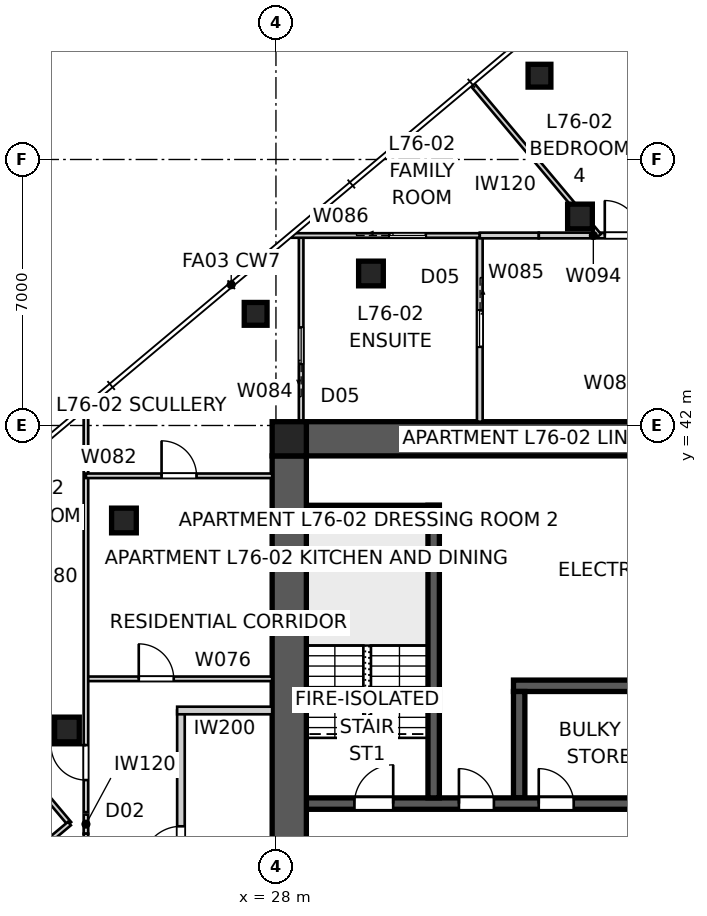
"""IFC4 building model, lengths in metres.
Left out: names, types, materials, properties, quantities, classifications, styles, units other than length and angle.
Written with IfcOpenShell. Run it as: python <this file> out.ifc"""

import sys

from ifc_helpers import new_model, si_unit, direction, frame, frame_2d, origin, origin_2d, place, context, subcontext, project, spatial, polyline, rectangle, outline, extrude, element, fill, save


model = new_model("IFC4")
c1 = context("Model", 3, precision=1e-05, world=origin(), true_north=direction((0.0, 1.0)))
c2 = subcontext(c1, "Body", "Model", "MODEL_VIEW")
j1 = project(units=[si_unit("LENGTHUNIT", "METRE"), si_unit("PLANEANGLEUNIT", "RADIAN")], contexts=[c1])
p1 = place(None, origin())
s1 = spatial("IfcSite", under=j1, at=p1, CompositionType="ELEMENT")
p2 = place(p1, origin())
s2 = spatial("IfcBuilding", under=s1, at=p2, CompositionType="ELEMENT")
p3 = place(p2, frame((0.0, 0.0, 276.0)))
s3 = spatial("IfcBuildingStorey", under=s2, at=p3, CompositionType="ELEMENT", Elevation=276.0)
p4 = place(p3, frame((28.8, 41.65, 0.0), z_axis=(0.0, 0.0, 1.0), x_axis=(1.0, 0.0, 0.0)))
e1 = element("IfcWall", 1, at=p4, inside=s3, PredefinedType="SHEAR", context=c2, shape_type="SweptSolid", body=[
    extrude(outline(polyline([(0.0, -0.45), (22.4, -0.45), (22.4, -0.025), (22.85, -0.025), (22.85, 0.025), (22.4, 0.025), (22.4, 0.45), (0.0, 0.45), (0.0, 0.025), (-0.45, 0.025), (-0.45, -0.025), (0.0, -0.025), (0.0, -0.45)])), origin(), (0.0, 0.0, 1.0), 3.4),
])
p5 = place(p3, frame((28.35, 41.2, 0.0), z_axis=(0.0, 0.0, 1.0), x_axis=(0.0, -1.0, 0.0)))
e2 = element("IfcWall", 2, at=p5, inside=s3, PredefinedType="SHEAR", context=c2, shape_type="SweptSolid", body=[
    extrude(outline(polyline([(0.0, -0.45), (22.4, -0.45), (22.4, -0.025), (22.85, -0.025), (22.85, 0.025), (22.4, 0.025), (22.4, 0.45), (0.0, 0.45), (0.0, 0.025), (-0.45, 0.025), (-0.45, -0.025), (0.0, -0.025), (0.0, -0.45)])), origin(), (0.0, 0.0, 1.0), 3.4),
])
p6 = place(p5, frame((11.14, 0.0, 0.0)))
e3 = element("IfcOpeningElement", 3, at=p6, cuts=e2, PredefinedType="OPENING", context=c2, shape_type="SweptSolid", body=[
    extrude(rectangle(XDim=1.02, YDim=2.4, at=frame_2d((0.51, 1.2))), frame((0.0, 0.46, 0.0), z_axis=(0.0, -1.0, 0.0), x_axis=(1.0, 0.0, 0.0)), (0.0, 0.0, 1.0), 0.92),
])
p7 = place(p3, frame((28.8, 32.05, 0.0), z_axis=(0.0, 0.0, 1.0), x_axis=(1.0, 0.0, 0.0)))
e4 = element("IfcWall", 4, at=p7, inside=s3, PredefinedType="SHEAR", context=c2, shape_type="SweptSolid", body=[
    extrude(rectangle(XDim=22.4, YDim=0.3, at=frame_2d((11.2, 0.0))), origin(), (0.0, 0.0, 1.0), 3.4),
])
p8 = place(p7, frame((19.04, 0.0, 0.0)))
e5 = element("IfcOpeningElement", 5, at=p8, cuts=e4, PredefinedType="OPENING", context=c2, shape_type="SweptSolid", body=[
    extrude(rectangle(XDim=0.92, YDim=2.1, at=frame_2d((0.46, 1.05))), frame((0.0, 0.16, 0.0), z_axis=(0.0, -1.0, 0.0), x_axis=(1.0, 0.0, 0.0)), (0.0, 0.0, 1.0), 0.32),
])
p9 = place(p7, frame((1.265, 0.0, 0.0)))
e6 = element("IfcOpeningElement", 6, at=p9, cuts=e4, PredefinedType="OPENING", context=c2, shape_type="SweptSolid", body=[
    extrude(rectangle(XDim=1.02, YDim=2.1, at=frame_2d((0.51, 1.05))), frame((0.0, 0.16, 0.0), z_axis=(0.0, -1.0, 0.0), x_axis=(1.0, 0.0, 0.0)), (0.0, 0.0, 1.0), 0.32),
])
p10 = place(p7, frame((4.015, 0.0, 0.0)))
e7 = element("IfcOpeningElement", 7, at=p10, cuts=e4, PredefinedType="OPENING", context=c2, shape_type="SweptSolid", body=[
    extrude(rectangle(XDim=0.92, YDim=2.1, at=frame_2d((0.46, 1.05))), frame((0.0, 0.16, 0.0), z_axis=(0.0, -1.0, 0.0), x_axis=(1.0, 0.0, 0.0)), (0.0, 0.0, 1.0), 0.32),
])
p11 = place(p7, frame((6.115, 0.0, 0.0)))
e8 = element("IfcOpeningElement", 8, at=p11, cuts=e4, PredefinedType="OPENING", context=c2, shape_type="SweptSolid", body=[
    extrude(rectangle(XDim=0.92, YDim=2.1, at=frame_2d((0.46, 1.05))), frame((0.0, 0.16, 0.0), z_axis=(0.0, -1.0, 0.0), x_axis=(1.0, 0.0, 0.0)), (0.0, 0.0, 1.0), 0.32),
])
p12 = place(p7, frame((9.79, 0.0, 0.0)))
e9 = element("IfcOpeningElement", 9, at=p12, cuts=e4, PredefinedType="OPENING", context=c2, shape_type="SweptSolid", body=[
    extrude(rectangle(XDim=0.92, YDim=2.1, at=frame_2d((0.46, 1.05))), frame((0.0, 0.16, 0.0), z_axis=(0.0, -1.0, 0.0), x_axis=(1.0, 0.0, 0.0)), (0.0, 0.0, 1.0), 0.32),
])
p13 = place(p7, frame((12.05, 0.0, 0.0)))
e10 = element("IfcOpeningElement", 10, at=p13, cuts=e4, PredefinedType="OPENING", context=c2, shape_type="SweptSolid", body=[
    extrude(rectangle(XDim=1.1, YDim=2.1, at=frame_2d((0.55, 1.05))), frame((0.0, 0.16, 0.0), z_axis=(0.0, -1.0, 0.0), x_axis=(1.0, 0.0, 0.0)), (0.0, 0.0, 1.0), 0.32),
])
p14 = place(p7, frame((14.85, 0.0, 0.0)))
e11 = element("IfcOpeningElement", 11, at=p14, cuts=e4, PredefinedType="OPENING", context=c2, shape_type="SweptSolid", body=[
    extrude(rectangle(XDim=1.1, YDim=2.1, at=frame_2d((0.55, 1.05))), frame((0.0, 0.16, 0.0), z_axis=(0.0, -1.0, 0.0), x_axis=(1.0, 0.0, 0.0)), (0.0, 0.0, 1.0), 0.32),
])
p15 = place(p3, frame((34.25, 35.15, 0.0), z_axis=(0.0, 0.0, 1.0), x_axis=(1.0, 0.0, 0.0)))
e12 = element("IfcWall", 12, at=p15, inside=s3, PredefinedType="SHEAR", context=c2, shape_type="SweptSolid", body=[
    extrude(rectangle(XDim=11.5, YDim=0.3, at=frame_2d((5.75, 0.0))), origin(), (0.0, 0.0, 1.0), 3.4),
])
p16 = place(p3, frame((34.4, 32.2, 0.0), z_axis=(0.0, 0.0, 1.0), x_axis=(0.0, 1.0, 0.0)))
e13 = element("IfcWall", 13, at=p16, inside=s3, PredefinedType="SHEAR", context=c2, shape_type="SweptSolid", body=[
    extrude(rectangle(XDim=2.8, YDim=0.3, at=frame_2d((1.4, 0.0))), origin(), (0.0, 0.0, 1.0), 3.4),
])
p17 = place(p3, frame((32.15, 32.2, 0.0), z_axis=(0.0, 0.0, 1.0), x_axis=(0.0, 1.0, 0.0)))
e14 = element("IfcWall", 14, at=p17, inside=s3, PredefinedType="SHEAR", context=c2, shape_type="SweptSolid", body=[
    extrude(rectangle(XDim=7.7, YDim=0.3, at=frame_2d((3.85, 0.0))), origin(), (0.0, 0.0, 1.0), 3.4),
])
p18 = place(p3, frame((28.8, 39.75, 0.0), z_axis=(0.0, 0.0, 1.0), x_axis=(1.0, 0.0, 0.0)))
e15 = element("IfcWall", 15, at=p18, inside=s3, PredefinedType="SHEAR", context=c2, shape_type="SweptSolid", body=[
    extrude(rectangle(XDim=3.5, YDim=0.3, at=frame_2d((1.75, 0.0))), origin(), (0.0, 0.0, 1.0), 3.4),
])
p19 = place(p3, frame((28.35, 41.65, 0.0), z_axis=(0.0, 0.0, 1.0), x_axis=(1.0, 0.0, 0.0)))
e16 = element("IfcColumn", 16, at=p19, inside=s3, PredefinedType="COLUMN", context=c2, shape_type="SweptSolid", body=[
    extrude(rectangle(XDim=0.9, YDim=0.9, at=origin_2d()), origin(), (0.0, 0.0, 1.0), 3.4),
])
for number, where, z_axis, x_axis in (
    (17, (34.935, 51.205, 0.0), (0.0, 0.0, 1.0), (1.0, 0.0, 0.0)),
    (18, (27.466, 44.938, 0.0), (0.0, 0.0, 1.0), (1.0, 0.0, 0.0)),
):
    element("IfcColumn", number, at=place(p3, frame(where, z_axis=z_axis, x_axis=x_axis)), inside=s3, PredefinedType="COLUMN", context=c2, shape_type="SweptSolid", body=[
        extrude(rectangle(XDim=0.6, YDim=0.6, at=origin_2d()), origin(), (0.0, 0.0, 1.0), 3.4),
    ])
for number, where, z_axis, x_axis in (
    (19, (36.0, 47.5, 0.0), (0.0, 0.0, 1.0), (1.0, 0.0, 0.0)),
    (20, (30.5, 46.0, 0.0), (0.0, 0.0, 1.0), (1.0, 0.0, 0.0)),
    (21, (24.0, 39.5, 0.0), (0.0, 0.0, 1.0), (1.0, 0.0, 0.0)),
    (22, (22.5, 34.0, 0.0), (0.0, 0.0, 1.0), (1.0, 0.0, 0.0)),
):
    element("IfcColumn", number, at=place(p3, frame(where, z_axis=z_axis, x_axis=x_axis)), inside=s3, PredefinedType="COLUMN", context=c2, shape_type="SweptSolid", body=[
        extrude(rectangle(XDim=0.65, YDim=0.65, at=origin_2d()), origin(), (0.0, 0.0, 1.0), 3.4),
    ])
p20 = place(p3, frame((25.5, 25.5, 0.0), z_axis=(0.0, 0.0, 1.0), x_axis=(0.0, 1.0, 0.0)))
e23 = element("IfcWall", 23, at=p20, inside=s3, PredefinedType="PARTITIONING", context=c2, shape_type="SweptSolid", body=[
    extrude(rectangle(XDim=9.0, YDim=0.2, at=frame_2d((4.5, 0.0))), origin(), (0.0, 0.0, 1.0), 3.25),
])
p21 = place(p20, frame((4.933, 0.0, 0.0)))
e24 = element("IfcOpeningElement", 24, at=p21, cuts=e23, PredefinedType="OPENING", context=c2, shape_type="SweptSolid", body=[
    extrude(rectangle(XDim=1.02, YDim=2.34, at=frame_2d((0.51, 1.17))), frame((0.0, 0.11, 0.0), z_axis=(0.0, -1.0, 0.0), x_axis=(1.0, 0.0, 0.0)), (0.0, 0.0, 1.0), 0.22),
])
p22 = place(p3, frame((27.9, 34.5, 0.0), z_axis=(0.0, 0.0, 1.0), x_axis=(-1.0, 0.0, 0.0)))
e25 = element("IfcWall", 25, at=p22, inside=s3, PredefinedType="PARTITIONING", context=c2, shape_type="SweptSolid", body=[
    extrude(rectangle(XDim=2.5, YDim=0.2, at=frame_2d((1.25, 0.0))), origin(), (0.0, 0.0, 1.0), 3.25),
])
p23 = place(p3, frame((23.0, 35.333, 0.0), z_axis=(0.0, 0.0, 1.0), x_axis=(1.0, 0.0, 0.0)))
e26 = element("IfcWall", 26, at=p23, inside=s3, PredefinedType="PARTITIONING", context=c2, shape_type="SweptSolid", body=[
    extrude(rectangle(XDim=4.9, YDim=0.12, at=frame_2d((2.45, 0.0))), origin(), (0.0, 0.0, 1.0), 3.25),
])
p24 = place(p23, frame((1.39, 0.0, 0.0)))
e27 = element("IfcOpeningElement", 27, at=p24, cuts=e26, PredefinedType="OPENING", context=c2, shape_type="SweptSolid", body=[
    extrude(rectangle(XDim=0.92, YDim=2.34, at=frame_2d((0.46, 1.17))), frame((0.0, 0.07, 0.0), z_axis=(0.0, -1.0, 0.0), x_axis=(1.0, 0.0, 0.0)), (0.0, 0.0, 1.0), 0.14),
])
p25 = place(p3, frame((23.0, 31.258, 0.0), z_axis=(0.0, 0.0, 1.0), x_axis=(0.0, 1.0, 0.0)))
e28 = element("IfcWall", 28, at=p25, inside=s3, PredefinedType="PARTITIONING", context=c2, shape_type="SweptSolid", body=[
    extrude(rectangle(XDim=0.504, YDim=0.12, at=frame_2d((0.252, 0.0))), origin(), (0.0, 0.0, 1.0), 3.25),
])
p26 = place(p3, frame((23.0, 31.824, 0.0), z_axis=(0.0, 0.0, 1.0), x_axis=(0.0, 1.0, 0.0)))
e29 = element("IfcWall", 29, at=p26, inside=s3, PredefinedType="PARTITIONING", context=c2, shape_type="SweptSolid", body=[
    extrude(rectangle(XDim=10.619, YDim=0.12, at=frame_2d((5.31, 0.0))), origin(), (0.0, 0.0, 1.0), 2.549),
])
p27 = place(p26, frame((0.844, 0.0, 0.0)))
e30 = element("IfcOpeningElement", 30, at=p27, cuts=e29, PredefinedType="OPENING", context=c2, shape_type="SweptSolid", body=[
    extrude(rectangle(XDim=0.92, YDim=2.34, at=frame_2d((0.46, 1.17))), frame((0.0, 0.07, 0.0), z_axis=(0.0, -1.0, 0.0), x_axis=(1.0, 0.0, 0.0)), (0.0, 0.0, 1.0), 0.14),
])
p28 = place(p3, frame((23.0, 40.676, 0.0), z_axis=(0.0, 0.0, 1.0), x_axis=(1.0, 0.0, 0.0)))
e31 = element("IfcWall", 31, at=p28, inside=s3, PredefinedType="PARTITIONING", context=c2, shape_type="SweptSolid", body=[
    extrude(rectangle(XDim=4.9, YDim=0.12, at=frame_2d((2.45, 0.0))), origin(), (0.0, 0.0, 1.0), 3.25),
])
p29 = place(p28, frame((1.99, 0.0, 0.0)))
e32 = element("IfcOpeningElement", 32, at=p29, cuts=e31, PredefinedType="OPENING", context=c2, shape_type="SweptSolid", body=[
    extrude(rectangle(XDim=0.92, YDim=2.1, at=frame_2d((0.46, 1.05))), frame((0.0, 0.07, 0.0), z_axis=(0.0, -1.0, 0.0), x_axis=(1.0, 0.0, 0.0)), (0.0, 0.0, 1.0), 0.14),
])
p30 = place(p3, frame((28.663, 41.18, 0.0), z_axis=(0.0, 0.0, 1.0), x_axis=(0.0, 1.0, 0.0)))
e33 = element("IfcWall", 33, at=p30, inside=s3, PredefinedType="PARTITIONING", context=c2, shape_type="SweptSolid", body=[
    extrude(rectangle(XDim=5.82, YDim=0.12, at=frame_2d((2.91, 0.0))), origin(), (0.0, 0.0, 1.0), 3.25),
])
p31 = place(p30, frame((2.44, 0.0, 0.0)))
e34 = element("IfcOpeningElement", 34, at=p31, cuts=e33, PredefinedType="OPENING", context=c2, shape_type="SweptSolid", body=[
    extrude(rectangle(XDim=0.96, YDim=2.1, at=frame_2d((0.48, 1.05))), frame((0.0, 0.07, 0.0), z_axis=(0.0, -1.0, 0.0), x_axis=(1.0, 0.0, 0.0)), (0.0, 0.0, 1.0), 0.14),
])
p32 = place(p3, frame((33.364, 47.0, 0.0), z_axis=(0.0, 0.0, 1.0), x_axis=(0.0, -1.0, 0.0)))
e35 = element("IfcWall", 35, at=p32, inside=s3, PredefinedType="SOLIDWALL", context=c2, shape_type="SweptSolid", body=[
    extrude(rectangle(XDim=4.9, YDim=0.15, at=frame_2d((2.45, 0.0))), origin(), (0.0, 0.0, 1.0), 3.25),
])
p33 = place(p32, frame((1.97, 0.0, 0.0)))
e36 = element("IfcOpeningElement", 36, at=p33, cuts=e35, PredefinedType="OPENING", context=c2, shape_type="SweptSolid", body=[
    extrude(rectangle(XDim=0.96, YDim=2.1, at=frame_2d((0.48, 1.05))), frame((0.0, 0.085, 0.0), z_axis=(0.0, -1.0, 0.0), x_axis=(1.0, 0.0, 0.0)), (0.0, 0.0, 1.0), 0.17),
])
p34 = place(p3, frame((28.43, 47.0, 0.0), z_axis=(0.0, 0.0, 1.0), x_axis=(1.0, 0.0, 0.0)))
e37 = element("IfcWall", 37, at=p34, inside=s3, PredefinedType="PARTITIONING", context=c2, shape_type="SweptSolid", body=[
    extrude(rectangle(XDim=4.934, YDim=0.12, at=frame_2d((2.467, 0.0))), origin(), (0.0, 0.0, 1.0), 3.25),
])
p35 = place(p34, frame((2.553, 0.0, 0.0)))
e38 = element("IfcOpeningElement", 38, at=p35, cuts=e37, PredefinedType="OPENING", context=c2, shape_type="SweptSolid", body=[
    extrude(rectangle(XDim=0.96, YDim=2.1, at=frame_2d((0.48, 1.05))), frame((0.0, 0.07, 0.0), z_axis=(0.0, -1.0, 0.0), x_axis=(1.0, 0.0, 0.0)), (0.0, 0.0, 1.0), 0.14),
])
p36 = place(p3, frame((33.364, 47.0, 0.0), z_axis=(0.0, 0.0, 1.0), x_axis=(1.0, 0.0, 0.0)))
e39 = element("IfcWall", 39, at=p36, inside=s3, PredefinedType="SOLIDWALL", context=c2, shape_type="SweptSolid", body=[
    extrude(rectangle(XDim=1.553, YDim=0.15, at=frame_2d((0.776, 0.0))), origin(), (0.0, 0.0, 1.0), 2.549),
])
p37 = place(p3, frame((34.917, 47.0, 0.0), z_axis=(0.0, 0.0, 1.0), x_axis=(1.0, 0.0, 0.0)))
e40 = element("IfcWall", 40, at=p37, inside=s3, PredefinedType="SOLIDWALL", context=c2, shape_type="SweptSolid", body=[
    extrude(rectangle(XDim=2.869, YDim=0.15, at=frame_2d((1.435, 0.0))), origin(), (0.0, 0.0, 1.0), 3.25),
])
p38 = place(p37, frame((1.736, 0.0, 0.0)))
e41 = element("IfcOpeningElement", 41, at=p38, cuts=e40, PredefinedType="OPENING", context=c2, shape_type="SweptSolid", body=[
    extrude(rectangle(XDim=0.92, YDim=2.34, at=frame_2d((0.46, 1.17))), frame((0.0, 0.085, 0.0), z_axis=(0.0, -1.0, 0.0), x_axis=(1.0, 0.0, 0.0)), (0.0, 0.0, 1.0), 0.17),
])
p39 = place(p3, frame((41.525, 47.434, 0.0), z_axis=(0.0, 0.0, 1.0), x_axis=(-0.642800378028, 0.766033729027, 0.0)))
e42 = element("IfcWall", 42, at=p39, inside=s3, PredefinedType="PARTITIONING", context=c2, shape_type="SweptSolid", body=[
    extrude(rectangle(XDim=8.085, YDim=0.12, at=frame_2d((4.042, 0.0))), origin(), (0.0, 0.0, 1.0), 3.25),
])
p40 = place(p39, frame((3.603, 0.0, 0.0)))
e43 = element("IfcOpeningElement", 43, at=p40, cuts=e42, PredefinedType="OPENING", context=c2, shape_type="SweptSolid", body=[
    extrude(rectangle(XDim=0.92, YDim=2.34, at=frame_2d((0.46, 1.17))), frame((0.0, 0.07, 0.0), z_axis=(0.0, -1.0, 0.0), x_axis=(1.0, 0.0, 0.0)), (0.0, 0.0, 1.0), 0.14),
])
p41 = place(p3, frame((17.369, 37.719, 0.0), z_axis=(0.0, 0.0, 1.0), x_axis=(0.642800378028, -0.766033729027, 0.0)))
e44 = element("IfcWall", 44, at=p41, inside=s3, PredefinedType="PARTITIONING", context=c2, shape_type="SweptSolid", body=[
    extrude(rectangle(XDim=8.085, YDim=0.12, at=frame_2d((4.042, 0.0))), origin(), (0.0, 0.0, 1.0), 3.25),
])
p42 = place(p41, frame((3.562, 0.0, 0.0)))
e45 = element("IfcOpeningElement", 45, at=p42, cuts=e44, PredefinedType="OPENING", context=c2, shape_type="SweptSolid", body=[
    extrude(rectangle(XDim=0.92, YDim=2.34, at=frame_2d((0.46, 1.17))), frame((0.0, 0.07, 0.0), z_axis=(0.0, -1.0, 0.0), x_axis=(1.0, 0.0, 0.0)), (0.0, 0.0, 1.0), 0.14),
])
p43 = place(p3, frame((22.566, 31.525, 0.0), z_axis=(0.0, 0.0, 1.0), x_axis=(-0.766033729027, -0.642800378028, 0.0)))
e46 = element("IfcWall", 46, at=p43, inside=s3, PredefinedType="PARTITIONING", context=c2, shape_type="SweptSolid", body=[
    extrude(rectangle(XDim=8.085, YDim=0.12, at=frame_2d((4.042, 0.0))), origin(), (0.0, 0.0, 1.0), 3.25),
])
p44 = place(p43, frame((5.64, 0.0, 0.0)))
e47 = element("IfcOpeningElement", 47, at=p44, cuts=e46, PredefinedType="OPENING", context=c2, shape_type="SweptSolid", body=[
    extrude(rectangle(XDim=0.92, YDim=2.34, at=frame_2d((0.46, 1.17))), frame((0.0, 0.07, 0.0), z_axis=(0.0, -1.0, 0.0), x_axis=(1.0, 0.0, 0.0)), (0.0, 0.0, 1.0), 0.14),
])
p45 = place(p3, frame((36.505, 47.0, 0.0), z_axis=(0.0, 0.0, 1.0), x_axis=(-0.642776136034, 0.76605407051, 0.0)))
e48 = element("IfcWall", 48, at=p45, inside=s3, PredefinedType="PARTITIONING", context=c2, shape_type="SweptSolid", body=[
    extrude(rectangle(XDim=5.191, YDim=0.12, at=frame_2d((2.595, 0.0))), origin(), (0.0, 0.0, 1.0), 3.25),
])
p46 = place(p3, frame((23.0, 31.258, 0.0), z_axis=(0.0, 0.0, 1.0), x_axis=(0.0, -1.0, 0.0)))
e49 = element("IfcWall", 49, at=p46, inside=s3, PredefinedType="PARTITIONING", context=c2, shape_type="SweptSolid", body=[
    extrude(rectangle(XDim=0.172, YDim=0.12, at=frame_2d((0.086, 0.0))), origin(), (0.0, 0.0, 1.0), 3.25),
])
p47 = place(p9, origin())
e50 = element("IfcDoor", 50, at=p47, inside=s3, OperationType="SINGLE_SWING_RIGHT", PredefinedType="DOOR", context=c2, shape_type="SweptSolid", body=[
    extrude(rectangle(XDim=1.02, YDim=2.1, at=frame_2d((0.51, 1.05))), frame((0.0, 0.025, 0.0), z_axis=(0.0, -1.0, 0.0), x_axis=(1.0, 0.0, 0.0)), (0.0, 0.0, 1.0), 0.05),
])
fill(e6, e50)
p48 = place(p10, origin())
e51 = element("IfcDoor", 51, at=p48, inside=s3, OperationType="SINGLE_SWING_LEFT", PredefinedType="DOOR", context=c2, shape_type="SweptSolid", body=[
    extrude(rectangle(XDim=0.92, YDim=2.1, at=frame_2d((0.46, 1.05))), frame((0.0, 0.025, 0.0), z_axis=(0.0, -1.0, 0.0), x_axis=(1.0, 0.0, 0.0)), (0.0, 0.0, 1.0), 0.05),
])
fill(e7, e51)
p49 = place(p21, origin())
e52 = element("IfcDoor", 52, at=p49, inside=s3, OperationType="SINGLE_SWING_LEFT", PredefinedType="DOOR", context=c2, shape_type="SweptSolid", body=[
    extrude(rectangle(XDim=1.02, YDim=2.34, at=frame_2d((0.51, 1.17))), frame((0.0, 0.025, 0.0), z_axis=(0.0, -1.0, 0.0), x_axis=(1.0, 0.0, 0.0)), (0.0, 0.0, 1.0), 0.05),
])
fill(e24, e52)
p50 = place(p24, origin())
e53 = element("IfcDoor", 53, at=p50, inside=s3, OperationType="SINGLE_SWING_LEFT", PredefinedType="DOOR", context=c2, shape_type="SweptSolid", body=[
    extrude(rectangle(XDim=0.92, YDim=2.34, at=frame_2d((0.46, 1.17))), frame((0.0, 0.025, 0.0), z_axis=(0.0, -1.0, 0.0), x_axis=(1.0, 0.0, 0.0)), (0.0, 0.0, 1.0), 0.05),
])
fill(e27, e53)
p51 = place(p27, origin())
e54 = element("IfcDoor", 54, at=p51, inside=s3, OperationType="SINGLE_SWING_RIGHT", PredefinedType="DOOR", context=c2, shape_type="SweptSolid", body=[
    extrude(rectangle(XDim=0.92, YDim=2.34, at=frame_2d((0.46, 1.17))), frame((0.0, 0.025, 0.0), z_axis=(0.0, -1.0, 0.0), x_axis=(1.0, 0.0, 0.0)), (0.0, 0.0, 1.0), 0.05),
])
fill(e30, e54)
p52 = place(p29, origin())
e55 = element("IfcDoor", 55, at=p52, inside=s3, OperationType="SINGLE_SWING_LEFT", PredefinedType="DOOR", context=c2, shape_type="SweptSolid", body=[
    extrude(rectangle(XDim=0.92, YDim=2.1, at=frame_2d((0.46, 1.05))), frame((0.0, 0.025, 0.0), z_axis=(0.0, -1.0, 0.0), x_axis=(1.0, 0.0, 0.0)), (0.0, 0.0, 1.0), 0.05),
])
fill(e32, e55)
p53 = place(p31, origin())
e56 = element("IfcDoor", 56, at=p53, inside=s3, OperationType="SLIDING_TO_LEFT", PredefinedType="DOOR", context=c2, shape_type="SweptSolid", body=[
    extrude(rectangle(XDim=0.96, YDim=2.1, at=frame_2d((0.48, 1.05))), frame((0.0, 0.025, 0.0), z_axis=(0.0, -1.0, 0.0), x_axis=(1.0, 0.0, 0.0)), (0.0, 0.0, 1.0), 0.05),
])
fill(e34, e56)
p54 = place(p33, origin())
e57 = element("IfcDoor", 57, at=p54, inside=s3, OperationType="SLIDING_TO_LEFT", PredefinedType="DOOR", context=c2, shape_type="SweptSolid", body=[
    extrude(rectangle(XDim=0.96, YDim=2.1, at=frame_2d((0.48, 1.05))), frame((0.0, 0.025, 0.0), z_axis=(0.0, -1.0, 0.0), x_axis=(1.0, 0.0, 0.0)), (0.0, 0.0, 1.0), 0.05),
])
fill(e36, e57)
p55 = place(p35, origin())
e58 = element("IfcDoor", 58, at=p55, inside=s3, OperationType="SLIDING_TO_LEFT", PredefinedType="DOOR", context=c2, shape_type="SweptSolid", body=[
    extrude(rectangle(XDim=0.96, YDim=2.1, at=frame_2d((0.48, 1.05))), frame((0.0, 0.025, 0.0), z_axis=(0.0, -1.0, 0.0), x_axis=(1.0, 0.0, 0.0)), (0.0, 0.0, 1.0), 0.05),
])
fill(e38, e58)
p56 = place(p38, origin())
e59 = element("IfcDoor", 59, at=p56, inside=s3, OperationType="SINGLE_SWING_LEFT", PredefinedType="DOOR", context=c2, shape_type="SweptSolid", body=[
    extrude(rectangle(XDim=0.92, YDim=2.34, at=frame_2d((0.46, 1.17))), frame((0.0, 0.025, 0.0), z_axis=(0.0, -1.0, 0.0), x_axis=(1.0, 0.0, 0.0)), (0.0, 0.0, 1.0), 0.05),
])
fill(e41, e59)
p57 = place(p11, origin())
e60 = element("IfcDoor", 60, at=p57, inside=s3, OperationType="SINGLE_SWING_LEFT", PredefinedType="DOOR", context=c2, shape_type="SweptSolid", body=[
    extrude(rectangle(XDim=0.92, YDim=2.1, at=frame_2d((0.46, 1.05))), frame((0.0, 0.025, 0.0), z_axis=(0.0, -1.0, 0.0), x_axis=(1.0, 0.0, 0.0)), (0.0, 0.0, 1.0), 0.05),
])
fill(e8, e60)
save(model, sys.argv[1])
